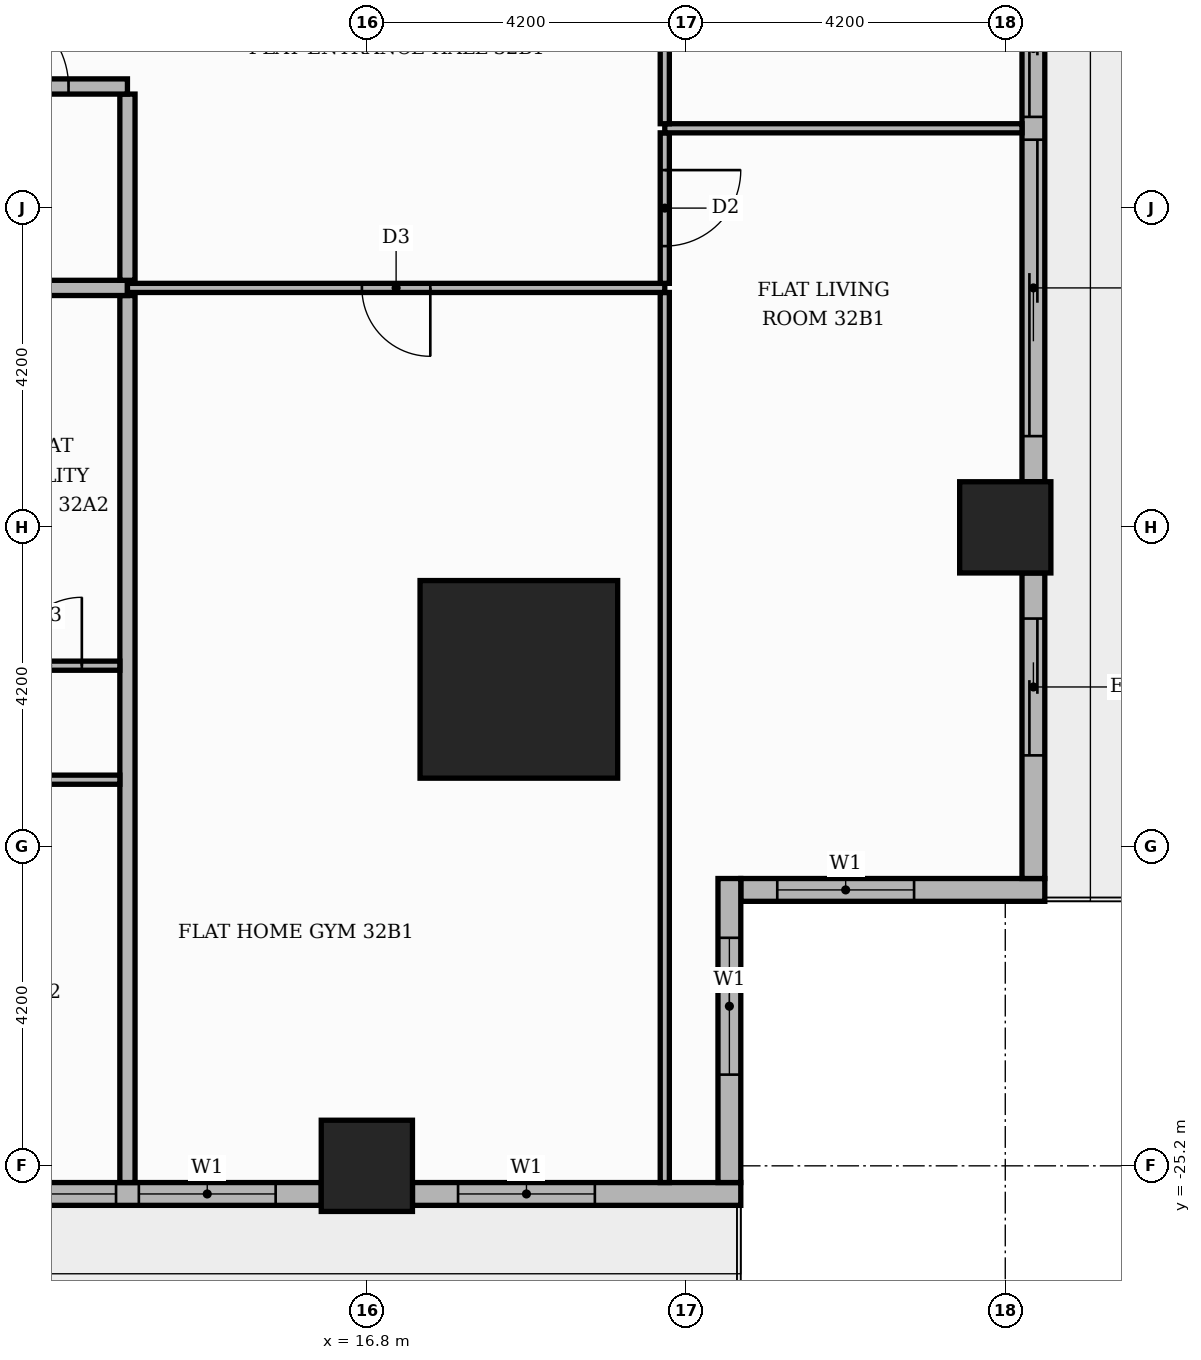
"""IFC4 building model, lengths in metres.
Left out: names, types, materials, properties, quantities, classifications, styles, units other than length and angle.
Written with IfcOpenShell. Run it as: python <this file> out.ifc"""

import sys

from ifc_helpers import new_model, si_unit, direction, frame, frame_2d, origin, origin_2d, place, context, subcontext, project, spatial, rectangle, extrude, element, fill, save


model = new_model("IFC4")
c1 = context("Model", 3, precision=1e-05, world=origin(), true_north=direction((0.0, 1.0)))
c2 = subcontext(c1, "Body", "Model", "MODEL_VIEW")
j1 = project(units=[si_unit("LENGTHUNIT", "METRE"), si_unit("PLANEANGLEUNIT", "RADIAN")], contexts=[c1])
p1 = place(None, origin())
s1 = spatial("IfcSite", under=j1, at=p1, CompositionType="ELEMENT")
p2 = place(p1, origin())
s2 = spatial("IfcBuilding", under=s1, at=p2, CompositionType="ELEMENT")
p3 = place(p2, frame((0.0, 0.0, 137.7)))
s3 = spatial("IfcBuildingStorey", under=s2, at=p3, CompositionType="ELEMENT", Elevation=137.7)
p4 = place(p3, frame((18.8, -18.8, 0.0), z_axis=(0.0, 0.0, 1.0), x_axis=(1.0, 0.0, 0.0)))
e1 = element("IfcColumn", 1, at=p4, inside=s3, PredefinedType="COLUMN", context=c2, shape_type="SweptSolid", body=[
    extrude(rectangle(XDim=2.6, YDim=2.6, at=origin_2d()), origin(), (0.0, 0.0, 1.0), 3.9),
])
for number, where, z_axis, x_axis in (
    (2, (25.2, -16.8, 0.0), (0.0, 0.0, 1.0), (1.0, 0.0, 0.0)),
    (3, (16.8, -25.2, 0.0), (0.0, 0.0, 1.0), (1.0, 0.0, 0.0)),
):
    element("IfcColumn", number, at=place(p3, frame(where, z_axis=z_axis, x_axis=x_axis)), inside=s3, PredefinedType="COLUMN", context=c2, shape_type="SweptSolid", body=[
        extrude(rectangle(XDim=1.2, YDim=1.2, at=origin_2d()), origin(), (0.0, 0.0, 1.0), 3.9),
    ])
p5 = place(p3, frame((21.72, -21.57, 0.0), z_axis=(0.0, 0.0, 1.0), x_axis=(1.0, 0.0, 0.0)))
e4 = element("IfcWall", 4, at=p5, inside=s3, PredefinedType="STANDARD", context=c2, shape_type="SweptSolid", body=[
    extrude(rectangle(XDim=4.0, YDim=0.3, at=frame_2d((2.0, 0.0))), origin(), (0.0, 0.0, 1.0), 3.48),
])
p6 = place(p5, frame((0.48, 0.0, 0.9)))
e5 = element("IfcOpeningElement", 5, at=p6, cuts=e4, PredefinedType="OPENING", context=c2, shape_type="SweptSolid", body=[
    extrude(rectangle(XDim=1.8, YDim=2.1, at=frame_2d((0.9, 1.05))), frame((0.0, 0.16, 0.0), z_axis=(0.0, -1.0, 0.0), x_axis=(1.0, 0.0, 0.0)), (0.0, 0.0, 1.0), 0.32),
])
p7 = place(p3, frame((25.57, -21.42, 0.0), z_axis=(0.0, 0.0, 1.0), x_axis=(0.0, 1.0, 0.0)))
e6 = element("IfcWall", 6, at=p7, inside=s3, PredefinedType="STANDARD", context=c2, shape_type="SweptSolid", body=[
    extrude(rectangle(XDim=4.02, YDim=0.3, at=frame_2d((2.01, 0.0))), origin(), (0.0, 0.0, 1.0), 3.48),
])
p8 = place(p7, frame((1.62, 0.0, 0.0)))
e7 = element("IfcOpeningElement", 7, at=p8, cuts=e6, PredefinedType="OPENING", context=c2, shape_type="SweptSolid", body=[
    extrude(rectangle(XDim=1.8, YDim=2.4, at=frame_2d((0.9, 1.2))), frame((0.0, 0.16, 0.0), z_axis=(0.0, -1.0, 0.0), x_axis=(1.0, 0.0, 0.0)), (0.0, 0.0, 1.0), 0.32),
])
p9 = place(p3, frame((25.57, -16.2, 0.0), z_axis=(0.0, 0.0, 1.0), x_axis=(0.0, 1.0, 0.0)))
e8 = element("IfcWall", 8, at=p9, inside=s3, PredefinedType="STANDARD", context=c2, shape_type="SweptSolid", body=[
    extrude(rectangle(XDim=7.2, YDim=0.3, at=frame_2d((3.6, 0.0))), origin(), (0.0, 0.0, 1.0), 3.48),
])
p10 = place(p9, frame((0.6, 0.0, 0.0)))
e9 = element("IfcOpeningElement", 9, at=p10, cuts=e8, PredefinedType="OPENING", context=c2, shape_type="SweptSolid", body=[
    extrude(rectangle(XDim=3.9, YDim=2.4, at=frame_2d((1.95, 1.2))), frame((0.0, 0.16, 0.0), z_axis=(0.0, -1.0, 0.0), x_axis=(1.0, 0.0, 0.0)), (0.0, 0.0, 1.0), 0.32),
])
p11 = place(p9, frame((4.8, 0.0, 0.0)))
e10 = element("IfcOpeningElement", 10, at=p11, cuts=e8, PredefinedType="OPENING", context=c2, shape_type="SweptSolid", body=[
    extrude(rectangle(XDim=1.8, YDim=2.4, at=frame_2d((0.9, 1.2))), frame((0.0, 0.16, 0.0), z_axis=(0.0, -1.0, 0.0), x_axis=(1.0, 0.0, 0.0)), (0.0, 0.0, 1.0), 0.32),
])
p12 = place(p3, frame((9.0, -25.57, 0.0), z_axis=(0.0, 0.0, 1.0), x_axis=(1.0, 0.0, 0.0)))
e11 = element("IfcWall", 11, at=p12, inside=s3, PredefinedType="STANDARD", context=c2, shape_type="SweptSolid", body=[
    extrude(rectangle(XDim=7.2, YDim=0.3, at=frame_2d((3.6, 0.0))), origin(), (0.0, 0.0, 1.0), 3.48),
])
p13 = place(p12, frame((0.6, 0.0, 0.9)))
e12 = element("IfcOpeningElement", 12, at=p13, cuts=e11, PredefinedType="OPENING", context=c2, shape_type="SweptSolid", body=[
    extrude(rectangle(XDim=3.9, YDim=2.1, at=frame_2d((1.95, 1.05))), frame((0.0, 0.16, 0.0), z_axis=(0.0, -1.0, 0.0), x_axis=(1.0, 0.0, 0.0)), (0.0, 0.0, 1.0), 0.32),
])
p14 = place(p12, frame((4.8, 0.0, 0.9)))
e13 = element("IfcOpeningElement", 13, at=p14, cuts=e11, PredefinedType="OPENING", context=c2, shape_type="SweptSolid", body=[
    extrude(rectangle(XDim=1.8, YDim=2.1, at=frame_2d((0.9, 1.05))), frame((0.0, 0.16, 0.0), z_axis=(0.0, -1.0, 0.0), x_axis=(1.0, 0.0, 0.0)), (0.0, 0.0, 1.0), 0.32),
])
p15 = place(p3, frame((17.4, -25.57, 0.0), z_axis=(0.0, 0.0, 1.0), x_axis=(1.0, 0.0, 0.0)))
e14 = element("IfcWall", 14, at=p15, inside=s3, PredefinedType="STANDARD", context=c2, shape_type="SweptSolid", body=[
    extrude(rectangle(XDim=4.32, YDim=0.3, at=frame_2d((2.16, 0.0))), origin(), (0.0, 0.0, 1.0), 3.48),
])
p16 = place(p15, frame((0.6, 0.0, 0.9)))
e15 = element("IfcOpeningElement", 15, at=p16, cuts=e14, PredefinedType="OPENING", context=c2, shape_type="SweptSolid", body=[
    extrude(rectangle(XDim=1.8, YDim=2.1, at=frame_2d((0.9, 1.05))), frame((0.0, 0.16, 0.0), z_axis=(0.0, -1.0, 0.0), x_axis=(1.0, 0.0, 0.0)), (0.0, 0.0, 1.0), 0.32),
])
p17 = place(p3, frame((21.57, -25.42, 0.0), z_axis=(0.0, 0.0, 1.0), x_axis=(0.0, 1.0, 0.0)))
e16 = element("IfcWall", 16, at=p17, inside=s3, PredefinedType="STANDARD", context=c2, shape_type="SweptSolid", body=[
    extrude(rectangle(XDim=4.0, YDim=0.3, at=frame_2d((2.0, 0.0))), origin(), (0.0, 0.0, 1.0), 3.48),
])
p18 = place(p17, frame((1.42, 0.0, 0.9)))
e17 = element("IfcOpeningElement", 17, at=p18, cuts=e16, PredefinedType="OPENING", context=c2, shape_type="SweptSolid", body=[
    extrude(rectangle(XDim=1.8, YDim=2.1, at=frame_2d((0.9, 1.05))), frame((0.0, 0.16, 0.0), z_axis=(0.0, -1.0, 0.0), x_axis=(1.0, 0.0, 0.0)), (0.0, 0.0, 1.0), 0.32),
])
p19 = place(p3, frame((13.65, -25.42, 0.0), z_axis=(0.0, 0.0, 1.0), x_axis=(0.0, 1.0, 0.0)))
e18 = element("IfcWall", 18, at=p19, inside=s3, PredefinedType="PARTITIONING", context=c2, shape_type="SweptSolid", body=[
    extrude(rectangle(XDim=11.67, YDim=0.2, at=frame_2d((5.835, 0.0))), origin(), (0.0, 0.0, 1.0), 3.48),
])
p20 = place(p3, frame((20.72, -25.42, 0.0), z_axis=(0.0, 0.0, 1.0), x_axis=(0.0, 1.0, 0.0)))
e19 = element("IfcWall", 19, at=p20, inside=s3, PredefinedType="PARTITIONING", context=c2, shape_type="SweptSolid", body=[
    extrude(rectangle(XDim=11.71, YDim=0.12, at=frame_2d((5.855, 0.0))), origin(), (0.0, 0.0, 1.0), 3.48),
])
p21 = place(p3, frame((-5.15, -20.12, 0.0), z_axis=(0.0, 0.0, 1.0), x_axis=(1.0, 0.0, 0.0)))
e20 = element("IfcWall", 20, at=p21, inside=s3, PredefinedType="PARTITIONING", context=c2, shape_type="SweptSolid", body=[
    extrude(rectangle(XDim=18.7, YDim=0.12, at=frame_2d((9.35, 0.0))), origin(), (0.0, 0.0, 1.0), 3.48),
])
p22 = place(p21, frame((2.55, 0.0, 0.0)))
e21 = element("IfcOpeningElement", 21, at=p22, cuts=e20, PredefinedType="OPENING", context=c2, shape_type="SweptSolid", body=[
    extrude(rectangle(XDim=1.0, YDim=2.1, at=frame_2d((0.5, 1.05))), frame((0.0, 0.07, 0.0), z_axis=(0.0, -1.0, 0.0), x_axis=(1.0, 0.0, 0.0)), (0.0, 0.0, 1.0), 0.14),
])
p23 = place(p21, frame((7.85, 0.0, 0.0)))
e22 = element("IfcOpeningElement", 22, at=p23, cuts=e20, PredefinedType="OPENING", context=c2, shape_type="SweptSolid", body=[
    extrude(rectangle(XDim=0.9, YDim=2.1, at=frame_2d((0.45, 1.05))), frame((0.0, 0.07, 0.0), z_axis=(0.0, -1.0, 0.0), x_axis=(1.0, 0.0, 0.0)), (0.0, 0.0, 1.0), 0.14),
])
p24 = place(p21, frame((16.25, 0.0, 0.0)))
e23 = element("IfcOpeningElement", 23, at=p24, cuts=e20, PredefinedType="OPENING", context=c2, shape_type="SweptSolid", body=[
    extrude(rectangle(XDim=0.9, YDim=2.1, at=frame_2d((0.45, 1.05))), frame((0.0, 0.07, 0.0), z_axis=(0.0, -1.0, 0.0), x_axis=(1.0, 0.0, 0.0)), (0.0, 0.0, 1.0), 0.14),
])
p25 = place(p3, frame((3.15, -18.62, 0.0), z_axis=(0.0, 0.0, 1.0), x_axis=(1.0, 0.0, 0.0)))
e24 = element("IfcWall", 24, at=p25, inside=s3, PredefinedType="PARTITIONING", context=c2, shape_type="SweptSolid", body=[
    extrude(rectangle(XDim=10.4, YDim=0.12, at=frame_2d((5.2, 0.0))), origin(), (0.0, 0.0, 1.0), 3.48),
])
p26 = place(p25, frame((2.7, 0.0, 0.0)))
e25 = element("IfcOpeningElement", 25, at=p26, cuts=e24, PredefinedType="OPENING", context=c2, shape_type="SweptSolid", body=[
    extrude(rectangle(XDim=0.9, YDim=2.1, at=frame_2d((0.45, 1.05))), frame((0.0, 0.07, 0.0), z_axis=(0.0, -1.0, 0.0), x_axis=(1.0, 0.0, 0.0)), (0.0, 0.0, 1.0), 0.14),
])
p27 = place(p25, frame((6.9, 0.0, 0.0)))
e26 = element("IfcOpeningElement", 26, at=p27, cuts=e24, PredefinedType="OPENING", context=c2, shape_type="SweptSolid", body=[
    extrude(rectangle(XDim=0.9, YDim=2.1, at=frame_2d((0.45, 1.05))), frame((0.0, 0.07, 0.0), z_axis=(0.0, -1.0, 0.0), x_axis=(1.0, 0.0, 0.0)), (0.0, 0.0, 1.0), 0.14),
])
p28 = place(p25, frame((9.0, 0.0, 0.0)))
e27 = element("IfcOpeningElement", 27, at=p28, cuts=e24, PredefinedType="OPENING", context=c2, shape_type="SweptSolid", body=[
    extrude(rectangle(XDim=0.9, YDim=2.1, at=frame_2d((0.45, 1.05))), frame((0.0, 0.07, 0.0), z_axis=(0.0, -1.0, 0.0), x_axis=(1.0, 0.0, 0.0)), (0.0, 0.0, 1.0), 0.14),
])
p29 = place(p3, frame((-25.42, -13.65, 0.0), z_axis=(0.0, 0.0, 1.0), x_axis=(1.0, 0.0, 0.0)))
e28 = element("IfcWall", 28, at=p29, inside=s3, PredefinedType="PARTITIONING", context=c2, shape_type="SweptSolid", body=[
    extrude(rectangle(XDim=39.07, YDim=0.2, at=frame_2d((19.535, 0.0))), origin(), (0.0, 0.0, 1.0), 3.48),
])
p30 = place(p29, frame((13.32, 0.0, 0.0)))
e29 = element("IfcOpeningElement", 29, at=p30, cuts=e28, PredefinedType="OPENING", context=c2, shape_type="SweptSolid", body=[
    extrude(rectangle(XDim=1.1, YDim=2.4, at=frame_2d((0.55, 1.2))), frame((0.0, 0.11, 0.0), z_axis=(0.0, -1.0, 0.0), x_axis=(1.0, 0.0, 0.0)), (0.0, 0.0, 1.0), 0.22),
])
p31 = place(p29, frame((25.92, 0.0, 0.0)))
e30 = element("IfcOpeningElement", 30, at=p31, cuts=e28, PredefinedType="OPENING", context=c2, shape_type="SweptSolid", body=[
    extrude(rectangle(XDim=1.1, YDim=2.4, at=frame_2d((0.55, 1.2))), frame((0.0, 0.11, 0.0), z_axis=(0.0, -1.0, 0.0), x_axis=(1.0, 0.0, 0.0)), (0.0, 0.0, 1.0), 0.22),
])
p32 = place(p3, frame((13.65, -13.65, 0.0), z_axis=(0.0, 0.0, 1.0), x_axis=(1.0, 0.0, 0.0)))
e31 = element("IfcWall", 31, at=p32, inside=s3, PredefinedType="PARTITIONING", context=c2, shape_type="SweptSolid", body=[
    extrude(rectangle(XDim=7.07, YDim=0.12, at=frame_2d((3.535, 0.0))), origin(), (0.0, 0.0, 1.0), 3.48),
])
p33 = place(p32, frame((3.085, 0.0, 0.0)))
e32 = element("IfcOpeningElement", 32, at=p33, cuts=e31, PredefinedType="OPENING", context=c2, shape_type="SweptSolid", body=[
    extrude(rectangle(XDim=0.9, YDim=2.1, at=frame_2d((0.45, 1.05))), frame((0.0, 0.07, 0.0), z_axis=(0.0, -1.0, 0.0), x_axis=(1.0, 0.0, 0.0)), (0.0, 0.0, 1.0), 0.14),
])
p34 = place(p3, frame((20.72, -13.59, 0.0), z_axis=(0.0, 0.0, 1.0), x_axis=(0.0, 1.0, 0.0)))
e33 = element("IfcWall", 33, at=p34, inside=s3, PredefinedType="PARTITIONING", context=c2, shape_type="SweptSolid", body=[
    extrude(rectangle(XDim=1.98, YDim=0.12, at=frame_2d((0.99, 0.0))), origin(), (0.0, 0.0, 1.0), 3.48),
])
p35 = place(p34, frame((0.49, 0.0, 0.0)))
e34 = element("IfcOpeningElement", 34, at=p35, cuts=e33, PredefinedType="OPENING", context=c2, shape_type="SweptSolid", body=[
    extrude(rectangle(XDim=1.0, YDim=2.1, at=frame_2d((0.5, 1.05))), frame((0.0, 0.07, 0.0), z_axis=(0.0, -1.0, 0.0), x_axis=(1.0, 0.0, 0.0)), (0.0, 0.0, 1.0), 0.14),
])
p36 = place(p3, frame((13.65, -13.55, 0.0), z_axis=(0.0, 0.0, 1.0), x_axis=(0.0, 1.0, 0.0)))
e35 = element("IfcWall", 35, at=p36, inside=s3, PredefinedType="PARTITIONING", context=c2, shape_type="SweptSolid", body=[
    extrude(rectangle(XDim=2.45, YDim=0.2, at=frame_2d((1.225, 0.0))), origin(), (0.0, 0.0, 1.0), 3.48),
])
p37 = place(p3, frame((20.72, -11.55, 0.0), z_axis=(0.0, 0.0, 1.0), x_axis=(1.0, 0.0, 0.0)))
e36 = element("IfcWall", 36, at=p37, inside=s3, PredefinedType="PARTITIONING", context=c2, shape_type="SweptSolid", body=[
    extrude(rectangle(XDim=4.7, YDim=0.12, at=frame_2d((2.35, 0.0))), origin(), (0.0, 0.0, 1.0), 3.48),
])
p38 = place(p3, frame((20.72, -11.49, 0.0), z_axis=(0.0, 0.0, 1.0), x_axis=(0.0, 1.0, 0.0)))
e37 = element("IfcWall", 37, at=p38, inside=s3, PredefinedType="PARTITIONING", context=c2, shape_type="SweptSolid", body=[
    extrude(rectangle(XDim=6.18, YDim=0.12, at=frame_2d((3.09, 0.0))), origin(), (0.0, 0.0, 1.0), 3.48),
])
p39 = place(p38, frame((2.59, 0.0, 0.0)))
e38 = element("IfcOpeningElement", 38, at=p39, cuts=e37, PredefinedType="OPENING", context=c2, shape_type="SweptSolid", body=[
    extrude(rectangle(XDim=1.0, YDim=2.1, at=frame_2d((0.5, 1.05))), frame((0.0, 0.07, 0.0), z_axis=(0.0, -1.0, 0.0), x_axis=(1.0, 0.0, 0.0)), (0.0, 0.0, 1.0), 0.14),
])
p40 = place(p3, frame((11.0, -11.0, 0.0), z_axis=(0.0, 0.0, 1.0), x_axis=(1.0, 0.0, 0.0)))
e39 = element("IfcWall", 39, at=p40, inside=s3, PredefinedType="PARTITIONING", context=c2, shape_type="SweptSolid", body=[
    extrude(rectangle(XDim=2.65, YDim=0.2, at=frame_2d((1.325, 0.0))), origin(), (0.0, 0.0, 1.0), 3.48),
])
p41 = place(p40, frame((0.775, 0.0, 0.0)))
e40 = element("IfcOpeningElement", 40, at=p41, cuts=e39, PredefinedType="OPENING", context=c2, shape_type="SweptSolid", body=[
    extrude(rectangle(XDim=1.1, YDim=2.4, at=frame_2d((0.55, 1.2))), frame((0.0, 0.11, 0.0), z_axis=(0.0, -1.0, 0.0), x_axis=(1.0, 0.0, 0.0)), (0.0, 0.0, 1.0), 0.22),
])
p42 = place(p6, origin())
e41 = element("IfcWindow", 41, at=p42, inside=s3, PartitioningType="SINGLE_PANEL", PredefinedType="WINDOW", context=c2, shape_type="SweptSolid", body=[
    extrude(rectangle(XDim=1.8, YDim=2.1, at=frame_2d((0.9, 1.05))), frame((0.0, 0.03, 0.0), z_axis=(0.0, -1.0, 0.0), x_axis=(1.0, 0.0, 0.0)), (0.0, 0.0, 1.0), 0.06),
])
fill(e5, e41)
p43 = place(p8, origin())
e42 = element("IfcDoor", 42, at=p43, inside=s3, OperationType="SLIDING_TO_RIGHT", PredefinedType="DOOR", context=c2, shape_type="SweptSolid", body=[
    extrude(rectangle(XDim=1.8, YDim=2.4, at=frame_2d((0.9, 1.2))), frame((0.0, 0.025, 0.0), z_axis=(0.0, -1.0, 0.0), x_axis=(1.0, 0.0, 0.0)), (0.0, 0.0, 1.0), 0.05),
])
fill(e7, e42)
p44 = place(p10, origin())
e43 = element("IfcDoor", 43, at=p44, inside=s3, OperationType="SLIDING_TO_LEFT", PredefinedType="DOOR", context=c2, shape_type="SweptSolid", body=[
    extrude(rectangle(XDim=3.9, YDim=2.4, at=frame_2d((1.95, 1.2))), frame((0.0, 0.025, 0.0), z_axis=(0.0, -1.0, 0.0), x_axis=(1.0, 0.0, 0.0)), (0.0, 0.0, 1.0), 0.05),
])
fill(e9, e43)
p45 = place(p11, origin())
e44 = element("IfcDoor", 44, at=p45, inside=s3, OperationType="SLIDING_TO_RIGHT", PredefinedType="DOOR", context=c2, shape_type="SweptSolid", body=[
    extrude(rectangle(XDim=1.8, YDim=2.4, at=frame_2d((0.9, 1.2))), frame((0.0, 0.025, 0.0), z_axis=(0.0, -1.0, 0.0), x_axis=(1.0, 0.0, 0.0)), (0.0, 0.0, 1.0), 0.05),
])
fill(e10, e44)
p46 = place(p13, origin())
e45 = element("IfcWindow", 45, at=p46, inside=s3, PartitioningType="SINGLE_PANEL", PredefinedType="WINDOW", context=c2, shape_type="SweptSolid", body=[
    extrude(rectangle(XDim=3.9, YDim=2.1, at=frame_2d((1.95, 1.05))), frame((0.0, 0.03, 0.0), z_axis=(0.0, -1.0, 0.0), x_axis=(1.0, 0.0, 0.0)), (0.0, 0.0, 1.0), 0.06),
])
fill(e12, e45)
p47 = place(p14, origin())
e46 = element("IfcWindow", 46, at=p47, inside=s3, PartitioningType="SINGLE_PANEL", PredefinedType="WINDOW", context=c2, shape_type="SweptSolid", body=[
    extrude(rectangle(XDim=1.8, YDim=2.1, at=frame_2d((0.9, 1.05))), frame((0.0, 0.03, 0.0), z_axis=(0.0, -1.0, 0.0), x_axis=(1.0, 0.0, 0.0)), (0.0, 0.0, 1.0), 0.06),
])
fill(e13, e46)
p48 = place(p16, origin())
e47 = element("IfcWindow", 47, at=p48, inside=s3, PartitioningType="SINGLE_PANEL", PredefinedType="WINDOW", context=c2, shape_type="SweptSolid", body=[
    extrude(rectangle(XDim=1.8, YDim=2.1, at=frame_2d((0.9, 1.05))), frame((0.0, 0.03, 0.0), z_axis=(0.0, -1.0, 0.0), x_axis=(1.0, 0.0, 0.0)), (0.0, 0.0, 1.0), 0.06),
])
fill(e15, e47)
p49 = place(p18, origin())
e48 = element("IfcWindow", 48, at=p49, inside=s3, PartitioningType="SINGLE_PANEL", PredefinedType="WINDOW", context=c2, shape_type="SweptSolid", body=[
    extrude(rectangle(XDim=1.8, YDim=2.1, at=frame_2d((0.9, 1.05))), frame((0.0, 0.03, 0.0), z_axis=(0.0, -1.0, 0.0), x_axis=(1.0, 0.0, 0.0)), (0.0, 0.0, 1.0), 0.06),
])
fill(e17, e48)
p50 = place(p28, origin())
e49 = element("IfcDoor", 49, at=p50, inside=s3, OperationType="SINGLE_SWING_RIGHT", PredefinedType="DOOR", context=c2, shape_type="SweptSolid", body=[
    extrude(rectangle(XDim=0.9, YDim=2.1, at=frame_2d((0.45, 1.05))), frame((0.0, 0.025, 0.0), z_axis=(0.0, -1.0, 0.0), x_axis=(1.0, 0.0, 0.0)), (0.0, 0.0, 1.0), 0.05),
])
fill(e27, e49)
p51 = place(p41, origin())
e50 = element("IfcDoor", 50, at=p51, inside=s3, OperationType="SINGLE_SWING_LEFT", PredefinedType="DOOR", context=c2, shape_type="SweptSolid", body=[
    extrude(rectangle(XDim=1.1, YDim=2.4, at=frame_2d((0.55, 1.2))), frame((0.0, 0.025, 0.0), z_axis=(0.0, -1.0, 0.0), x_axis=(1.0, 0.0, 0.0)), (0.0, 0.0, 1.0), 0.05),
])
fill(e40, e50)
p52 = place(p33, frame((0.9, 0.0, 0.0), z_axis=(0.0, 0.0, 1.0), x_axis=(-1.0, 0.0, 0.0)))
e51 = element("IfcDoor", 51, at=p52, inside=s3, OperationType="SINGLE_SWING_RIGHT", PredefinedType="DOOR", context=c2, shape_type="SweptSolid", body=[
    extrude(rectangle(XDim=0.9, YDim=2.1, at=frame_2d((0.45, 1.05))), frame((0.0, 0.025, 0.0), z_axis=(0.0, -1.0, 0.0), x_axis=(1.0, 0.0, 0.0)), (0.0, 0.0, 1.0), 0.05),
])
fill(e32, e51)
p53 = place(p35, frame((1.0, 0.0, 0.0), z_axis=(0.0, 0.0, 1.0), x_axis=(-1.0, 0.0, 0.0)))
e52 = element("IfcDoor", 52, at=p53, inside=s3, OperationType="SINGLE_SWING_RIGHT", PredefinedType="DOOR", context=c2, shape_type="SweptSolid", body=[
    extrude(rectangle(XDim=1.0, YDim=2.1, at=frame_2d((0.5, 1.05))), frame((0.0, 0.025, 0.0), z_axis=(0.0, -1.0, 0.0), x_axis=(1.0, 0.0, 0.0)), (0.0, 0.0, 1.0), 0.05),
])
fill(e34, e52)
save(model, sys.argv[1])
